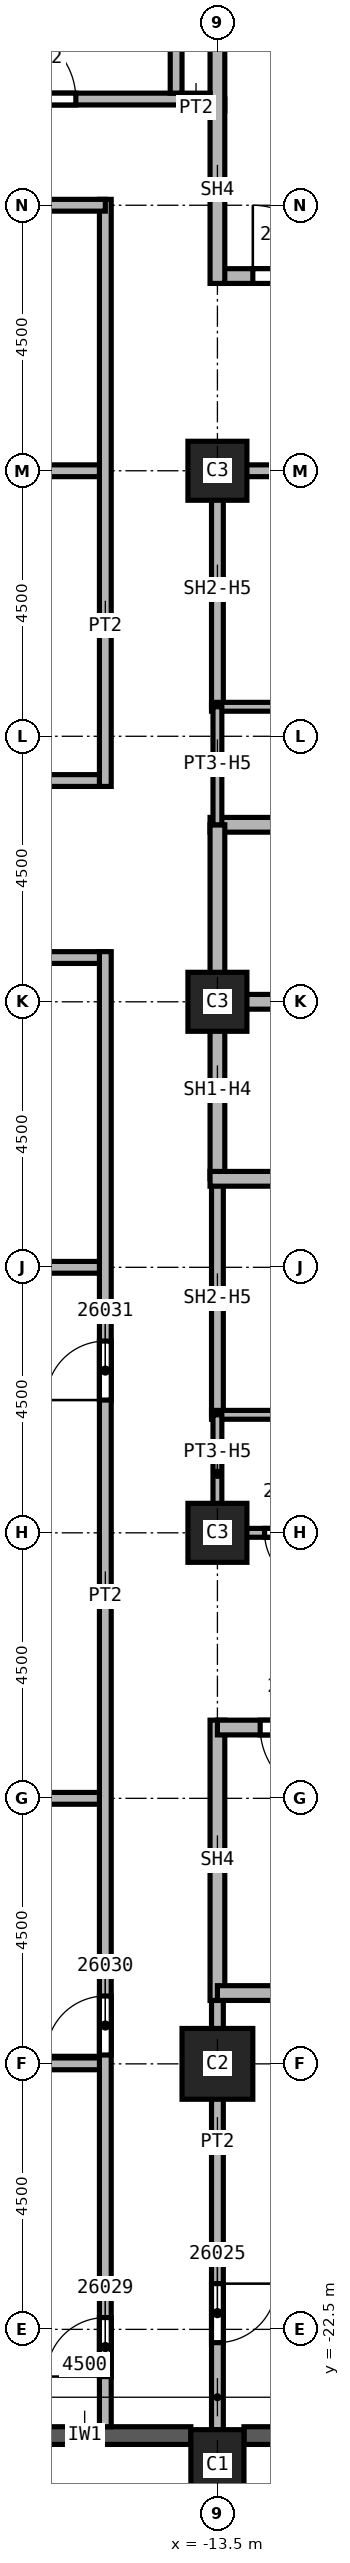
"""IFC4 building model, lengths in metres.
Left out: names, types, materials, properties, quantities, classifications, styles, units other than length and angle.
Written with IfcOpenShell. Run it as: python <this file> out.ifc"""

import sys

from ifc_helpers import new_model, si_unit, direction, frame, frame_2d, origin, origin_2d, place, context, subcontext, project, spatial, rectangle, extrude, element, fill, save


model = new_model("IFC4")
c1 = context("Model", 3, precision=1e-05, world=origin(), true_north=direction((0.0, 1.0)))
c2 = subcontext(c1, "Body", "Model", "MODEL_VIEW")
j1 = project(units=[si_unit("LENGTHUNIT", "METRE"), si_unit("PLANEANGLEUNIT", "RADIAN")], contexts=[c1])
p1 = place(None, origin())
s1 = spatial("IfcSite", under=j1, at=p1, CompositionType="ELEMENT")
p2 = place(p1, origin())
s2 = spatial("IfcBuilding", under=s1, at=p2, CompositionType="ELEMENT")
p3 = place(p2, frame((0.0, 0.0, 120.0)))
s3 = spatial("IfcBuildingStorey", under=s2, at=p3, CompositionType="ELEMENT", Elevation=120.0)
p4 = place(p3, frame((-13.5, -18.0, 0.0), z_axis=(0.0, 0.0, 1.0), x_axis=(1.0, 0.0, 0.0)))
e1 = element("IfcColumn", 1, at=p4, inside=s3, PredefinedType="COLUMN", context=c2, shape_type="SweptSolid", body=[
    extrude(rectangle(XDim=1.2, YDim=1.2, at=origin_2d()), origin(), (0.0, 0.0, 1.0), 5.7),
])
for number, where, z_axis, x_axis in (
    (2, (-13.5, 0.0, 0.0), (0.0, 0.0, 1.0), (1.0, 0.0, 0.0)),
    (3, (-13.5, 9.0, 0.0), (0.0, 0.0, 1.0), (1.0, 0.0, 0.0)),
    (4, (-13.5, -9.0, 0.0), (0.0, 0.0, 1.0), (1.0, 0.0, 0.0)),
):
    element("IfcColumn", number, at=place(p3, frame(where, z_axis=z_axis, x_axis=x_axis)), inside=s3, PredefinedType="COLUMN", context=c2, shape_type="SweptSolid", body=[
        extrude(rectangle(XDim=1.0, YDim=1.0, at=origin_2d()), origin(), (0.0, 0.0, 1.0), 5.7),
    ])
p5 = place(p3, frame((-13.5, -24.8, 0.0), z_axis=(0.0, 0.206004144013, 0.978551119078), x_axis=(-1.0, 0.0, 0.0)))
e5 = element("IfcColumn", 5, at=p5, inside=s3, PredefinedType="COLUMN", context=c2, shape_type="SweptSolid", body=[
    extrude(rectangle(XDim=0.9, YDim=1.2, at=origin_2d()), origin(), (0.0, 0.0, 1.0), 5.825),
])
for number, where, z_axis, x_axis in (
    (6, (-17.55, -24.3, 0.0), (0.0, 0.0, 1.0), (1.0, 0.0, 0.0)),
    (7, (-13.05, -24.3, 0.0), (0.0, 0.0, 1.0), (1.0, 0.0, 0.0)),
):
    element("IfcWall", number, at=place(p3, frame(where, z_axis=z_axis, x_axis=x_axis)), inside=s3, PredefinedType="SOLIDWALL", context=c2, shape_type="SweptSolid", body=[
        extrude(rectangle(XDim=3.6, YDim=0.3, at=frame_2d((1.8, 0.0))), origin(), (0.0, 0.0, 1.0), 5.1),
    ])
p6 = place(p3, frame((-33.85, 3.75, 0.0), z_axis=(0.0, 0.0, 1.0), x_axis=(1.0, 0.0, 0.0)))
e8 = element("IfcWall", 8, at=p6, inside=s3, PredefinedType="PARTITIONING", context=c2, shape_type="SweptSolid", body=[
    extrude(rectangle(XDim=18.45, YDim=0.2, at=frame_2d((9.225, 0.0))), origin(), (0.0, 0.0, 1.0), 5.7),
])
p7 = place(p6, frame((12.1, 0.0, 0.0)))
e9 = element("IfcOpeningElement", 9, at=p7, cuts=e8, PredefinedType="OPENING", context=c2, shape_type="SweptSolid", body=[
    extrude(rectangle(XDim=1.0, YDim=2.1, at=frame_2d((0.5, 1.05))), frame((0.0, 0.1, 0.0), z_axis=(0.0, -1.0, 0.0), x_axis=(1.0, 0.0, 0.0)), (0.0, 0.0, 1.0), 0.2),
])
p8 = place(p3, frame((-15.4, 0.75, 0.0), z_axis=(0.0, 0.0, 1.0), x_axis=(-1.0, 0.0, 0.0)))
e10 = element("IfcWall", 10, at=p8, inside=s3, PredefinedType="PARTITIONING", context=c2, shape_type="SweptSolid", body=[
    extrude(rectangle(XDim=18.45, YDim=0.2, at=frame_2d((9.225, 0.0))), origin(), (0.0, 0.0, 1.0), 5.7),
])
p9 = place(p8, frame((7.9, 0.0, 0.0)))
e11 = element("IfcOpeningElement", 11, at=p9, cuts=e10, PredefinedType="OPENING", context=c2, shape_type="SweptSolid", body=[
    extrude(rectangle(XDim=1.0, YDim=2.1, at=frame_2d((0.5, 1.05))), frame((0.0, 0.1, 0.0), z_axis=(0.0, -1.0, 0.0), x_axis=(1.0, 0.0, 0.0)), (0.0, 0.0, 1.0), 0.2),
])
p10 = place(p8, frame((13.4, 0.0, 0.0)))
e12 = element("IfcOpeningElement", 12, at=p10, cuts=e10, PredefinedType="OPENING", context=c2, shape_type="SweptSolid", body=[
    extrude(rectangle(XDim=1.0, YDim=2.1, at=frame_2d((0.5, 1.05))), frame((0.0, 0.1, 0.0), z_axis=(0.0, -1.0, 0.0), x_axis=(1.0, 0.0, 0.0)), (0.0, 0.0, 1.0), 0.2),
])
for number, where, z_axis, x_axis in (
    (13, (-27.1, -13.5, 0.0), (0.0, 0.0, 1.0), (1.0, 0.0, 0.0)),
    (14, (-27.1, -4.5, 0.0), (0.0, 0.0, 1.0), (1.0, 0.0, 0.0)),
    (15, (-27.1, 9.0, 0.0), (0.0, 0.0, 1.0), (1.0, 0.0, 0.0)),
):
    element("IfcWall", number, at=place(p3, frame(where, z_axis=z_axis, x_axis=x_axis)), inside=s3, PredefinedType="PARTITIONING", context=c2, shape_type="SweptSolid", body=[
        extrude(rectangle(XDim=11.7, YDim=0.2, at=frame_2d((5.85, 0.0))), origin(), (0.0, 0.0, 1.0), 5.7),
    ])
p11 = place(p3, frame((-24.15, -18.0, 0.0), z_axis=(0.0, 0.0, 1.0), x_axis=(1.0, 0.0, 0.0)))
e16 = element("IfcWall", 16, at=p11, inside=s3, PredefinedType="PARTITIONING", context=c2, shape_type="SweptSolid", body=[
    extrude(rectangle(XDim=8.75, YDim=0.2, at=frame_2d((4.375, 0.0))), origin(), (0.0, 0.0, 1.0), 5.7),
])
p12 = place(p3, frame((-15.4, -24.15, 0.0), z_axis=(0.0, 0.0, 1.0), x_axis=(0.0, 1.0, 0.0)))
e17 = element("IfcWall", 17, at=p12, inside=s3, PredefinedType="PARTITIONING", context=c2, shape_type="SweptSolid", body=[
    extrude(rectangle(XDim=25.0, YDim=0.2, at=frame_2d((12.5, 0.0))), origin(), (0.0, 0.0, 1.0), 5.7),
])
p13 = place(p12, frame((0.85, 0.0, 0.0)))
e18 = element("IfcOpeningElement", 18, at=p13, cuts=e17, PredefinedType="OPENING", context=c2, shape_type="SweptSolid", body=[
    extrude(rectangle(XDim=1.0, YDim=2.1, at=frame_2d((0.5, 1.05))), frame((0.0, 0.1, 0.0), z_axis=(0.0, -1.0, 0.0), x_axis=(1.0, 0.0, 0.0)), (0.0, 0.0, 1.0), 0.2),
])
p14 = place(p12, frame((6.3, 0.0, 0.0)))
e19 = element("IfcOpeningElement", 19, at=p14, cuts=e17, PredefinedType="OPENING", context=c2, shape_type="SweptSolid", body=[
    extrude(rectangle(XDim=1.0, YDim=2.1, at=frame_2d((0.5, 1.05))), frame((0.0, 0.1, 0.0), z_axis=(0.0, -1.0, 0.0), x_axis=(1.0, 0.0, 0.0)), (0.0, 0.0, 1.0), 0.2),
])
p15 = place(p12, frame((17.4, 0.0, 0.0)))
e20 = element("IfcOpeningElement", 20, at=p15, cuts=e17, PredefinedType="OPENING", context=c2, shape_type="SweptSolid", body=[
    extrude(rectangle(XDim=1.0, YDim=2.1, at=frame_2d((0.5, 1.05))), frame((0.0, 0.1, 0.0), z_axis=(0.0, -1.0, 0.0), x_axis=(1.0, 0.0, 0.0)), (0.0, 0.0, 1.0), 0.2),
])
p16 = place(p3, frame((-15.4, 3.65, 0.0), z_axis=(0.0, 0.0, 1.0), x_axis=(0.0, 1.0, 0.0)))
e21 = element("IfcWall", 21, at=p16, inside=s3, PredefinedType="PARTITIONING", context=c2, shape_type="SweptSolid", body=[
    extrude(rectangle(XDim=9.95, YDim=0.2, at=frame_2d((4.975, 0.0))), origin(), (0.0, 0.0, 1.0), 5.7),
])
p17 = place(p3, frame((-15.4, 13.5, 0.0), z_axis=(0.0, 0.0, 1.0), x_axis=(-1.0, 0.0, 0.0)))
e22 = element("IfcWall", 22, at=p17, inside=s3, PredefinedType="PARTITIONING", context=c2, shape_type="SweptSolid", body=[
    extrude(rectangle(XDim=6.6, YDim=0.2, at=frame_2d((3.3, 0.0))), origin(), (0.0, 0.0, 1.0), 5.7),
])
p18 = place(p17, frame((1.9, 0.0, 0.0)))
e23 = element("IfcOpeningElement", 23, at=p18, cuts=e22, PredefinedType="OPENING", context=c2, shape_type="SweptSolid", body=[
    extrude(rectangle(XDim=1.0, YDim=2.1, at=frame_2d((0.5, 1.05))), frame((0.0, 0.1, 0.0), z_axis=(0.0, -1.0, 0.0), x_axis=(1.0, 0.0, 0.0)), (0.0, 0.0, 1.0), 0.2),
])
p19 = place(p3, frame((-14.1, 15.2, 0.0), z_axis=(0.0, 0.0, 1.0), x_axis=(1.0, 0.0, 0.0)))
e24 = element("IfcWall", 24, at=p19, inside=s3, PredefinedType="PARTITIONING", context=c2, shape_type="SweptSolid", body=[
    extrude(rectangle(XDim=0.725, YDim=0.2, at=frame_2d((0.363, 0.0))), origin(), (0.0, 0.0, 1.0), 5.7),
])
p20 = place(p3, frame((-13.5, -16.675, 0.0), z_axis=(0.0, 0.0, 1.0), x_axis=(0.0, -1.0, 0.0)))
e25 = element("IfcWall", 25, at=p20, inside=s3, PredefinedType="PARTITIONING", context=c2, shape_type="SweptSolid", body=[
    extrude(rectangle(XDim=7.525, YDim=0.2, at=frame_2d((3.762, 0.0))), origin(), (0.0, 0.0, 1.0), 5.7),
])
p21 = place(p20, frame((5.05, 0.0, 0.0)))
e26 = element("IfcOpeningElement", 26, at=p21, cuts=e25, PredefinedType="OPENING", context=c2, shape_type="SweptSolid", body=[
    extrude(rectangle(XDim=1.0, YDim=2.1, at=frame_2d((0.5, 1.05))), frame((0.0, 0.1, 0.0), z_axis=(0.0, -1.0, 0.0), x_axis=(1.0, 0.0, 0.0)), (0.0, 0.0, 1.0), 0.2),
])
p22 = place(p3, frame((-13.5, -7.0, 0.0), z_axis=(0.0, 0.0, 1.0), x_axis=(0.0, 1.0, 0.0)))
e27 = element("IfcWall", 27, at=p22, inside=s3, PredefinedType="SOLIDWALL", context=c2, shape_type="SweptSolid", body=[
    extrude(rectangle(XDim=4.0, YDim=0.2, at=frame_2d((2.0, 0.0))), origin(), (0.0, 0.0, 1.0), 4.938),
])
p23 = place(p3, frame((-13.5, 5.0, 0.0), z_axis=(0.0, 0.0, 1.0), x_axis=(0.0, 1.0, 0.0)))
e28 = element("IfcWall", 28, at=p23, inside=s3, PredefinedType="SOLIDWALL", context=c2, shape_type="SweptSolid", body=[
    extrude(rectangle(XDim=4.1, YDim=0.2, at=frame_2d((2.05, 0.0))), origin(), (0.0, 0.0, 1.0), 4.938),
])
p24 = place(p3, frame((-13.5, 9.0, 0.0), z_axis=(0.0, 0.0, 1.0), x_axis=(1.0, 0.0, 0.0)))
e29 = element("IfcWall", 29, at=p24, inside=s3, PredefinedType="SOLIDWALL", context=c2, shape_type="SweptSolid", body=[
    extrude(rectangle(XDim=3.0, YDim=0.2, at=frame_2d((1.5, 0.0))), origin(), (0.0, 0.0, 1.0), 4.938),
])
p25 = place(p3, frame((-13.625, 0.0, 0.0), z_axis=(0.0, 0.0, 1.0), x_axis=(1.0, 0.0, 0.0)))
e30 = element("IfcWall", 30, at=p25, inside=s3, PredefinedType="SOLIDWALL", context=c2, shape_type="SweptSolid", body=[
    extrude(rectangle(XDim=3.125, YDim=0.25, at=frame_2d((1.562, 0.0))), origin(), (0.0, 0.0, 1.0), 5.7),
])
p26 = place(p3, frame((-13.625, 3.0, 0.0), z_axis=(0.0, 0.0, 1.0), x_axis=(1.0, 0.0, 0.0)))
e31 = element("IfcWall", 31, at=p26, inside=s3, PredefinedType="SOLIDWALL", context=c2, shape_type="SweptSolid", body=[
    extrude(rectangle(XDim=6.125, YDim=0.25, at=frame_2d((3.062, 0.0))), origin(), (0.0, 0.0, 1.0), 5.7),
])
p27 = place(p26, frame((3.25, 0.0, 0.0)))
e32 = element("IfcOpeningElement", 32, at=p27, cuts=e31, PredefinedType="OPENING", context=c2, shape_type="SweptSolid", body=[
    extrude(rectangle(XDim=1.1, YDim=2.1, at=frame_2d((0.55, 1.05))), frame((0.0, 0.125, 0.0), z_axis=(0.0, -1.0, 0.0), x_axis=(1.0, 0.0, 0.0)), (0.0, 0.0, 1.0), 0.25),
])
p28 = place(p3, frame((-13.5, -3.0, 0.0), z_axis=(0.0, 0.0, 1.0), x_axis=(0.0, 1.0, 0.0)))
e33 = element("IfcWall", 33, at=p28, inside=s3, PredefinedType="SOLIDWALL", context=c2, shape_type="SweptSolid", body=[
    extrude(rectangle(XDim=6.0, YDim=0.25, at=frame_2d((3.0, 0.0))), origin(), (0.0, 0.0, 1.0), 4.938),
])
p29 = place(p3, frame((-13.625, -3.0, 0.0), z_axis=(0.0, 0.0, 1.0), x_axis=(1.0, 0.0, 0.0)))
e34 = element("IfcWall", 34, at=p29, inside=s3, PredefinedType="SOLIDWALL", context=c2, shape_type="SweptSolid", body=[
    extrude(rectangle(XDim=9.25, YDim=0.25, at=frame_2d((4.625, 0.0))), origin(), (0.0, 0.0, 1.0), 5.7),
])
p30 = place(p29, frame((3.25, 0.0, 0.0)))
e35 = element("IfcOpeningElement", 35, at=p30, cuts=e34, PredefinedType="OPENING", context=c2, shape_type="SweptSolid", body=[
    extrude(rectangle(XDim=1.1, YDim=2.1, at=frame_2d((0.55, 1.05))), frame((0.0, 0.125, 0.0), z_axis=(0.0, -1.0, 0.0), x_axis=(1.0, 0.0, 0.0)), (0.0, 0.0, 1.0), 0.25),
])
p31 = place(p3, frame((-13.5, -12.175, 0.0), z_axis=(0.0, 0.0, 1.0), x_axis=(0.0, -1.0, 0.0)))
e36 = element("IfcWall", 36, at=p31, inside=s3, PredefinedType="SOLIDWALL", context=c2, shape_type="SweptSolid", body=[
    extrude(rectangle(XDim=4.75, YDim=0.25, at=frame_2d((2.375, 0.0))), origin(), (0.0, 0.0, 1.0), 5.7),
])
p32 = place(p3, frame((-13.5, 12.3, 0.0), z_axis=(0.0, 0.0, 1.0), x_axis=(1.0, 0.0, 0.0)))
e37 = element("IfcWall", 37, at=p32, inside=s3, PredefinedType="SOLIDWALL", context=c2, shape_type="SweptSolid", body=[
    extrude(rectangle(XDim=9.125, YDim=0.25, at=frame_2d((4.562, 0.0))), origin(), (0.0, 0.0, 1.0), 5.7),
])
p33 = place(p32, frame((0.6, 0.0, 0.0)))
e38 = element("IfcOpeningElement", 38, at=p33, cuts=e37, PredefinedType="OPENING", context=c2, shape_type="SweptSolid", body=[
    extrude(rectangle(XDim=1.2, YDim=2.1, at=frame_2d((0.6, 1.05))), frame((0.0, 0.125, 0.0), z_axis=(0.0, -1.0, 0.0), x_axis=(1.0, 0.0, 0.0)), (0.0, 0.0, 1.0), 0.25),
])
p34 = place(p3, frame((-13.5, 12.175, 0.0), z_axis=(0.0, 0.0, 1.0), x_axis=(0.0, 1.0, 0.0)))
e39 = element("IfcWall", 39, at=p34, inside=s3, PredefinedType="SOLIDWALL", context=c2, shape_type="SweptSolid", body=[
    extrude(rectangle(XDim=4.75, YDim=0.25, at=frame_2d((2.375, 0.0))), origin(), (0.0, 0.0, 1.0), 5.7),
])
p35 = place(p3, frame((-4.5, -16.8, 0.0), z_axis=(0.0, 0.0, 1.0), x_axis=(-1.0, 0.0, 0.0)))
e40 = element("IfcWall", 40, at=p35, inside=s3, PredefinedType="SOLIDWALL", context=c2, shape_type="SweptSolid", body=[
    extrude(rectangle(XDim=9.0, YDim=0.25, at=frame_2d((4.5, 0.0))), origin(), (0.0, 0.0, 1.0), 5.7),
])
p36 = place(p3, frame((-4.375, -12.3, 0.0), z_axis=(0.0, 0.0, 1.0), x_axis=(-1.0, 0.0, 0.0)))
e41 = element("IfcWall", 41, at=p36, inside=s3, PredefinedType="SOLIDWALL", context=c2, shape_type="SweptSolid", body=[
    extrude(rectangle(XDim=9.125, YDim=0.25, at=frame_2d((4.562, 0.0))), origin(), (0.0, 0.0, 1.0), 5.7),
])
p37 = place(p36, frame((7.2, 0.0, 0.0)))
e42 = element("IfcOpeningElement", 42, at=p37, cuts=e41, PredefinedType="OPENING", context=c2, shape_type="SweptSolid", body=[
    extrude(rectangle(XDim=1.2, YDim=2.1, at=frame_2d((0.6, 1.05))), frame((0.0, 0.125, 0.0), z_axis=(0.0, -1.0, 0.0), x_axis=(1.0, 0.0, 0.0)), (0.0, 0.0, 1.0), 0.25),
])
for number, where, z_axis, x_axis in (
    (43, (-13.6, -7.0, 0.0), (0.0, 0.0, 1.0), (1.0, 0.0, 0.0)),
    (44, (-13.6, 5.0, 0.0), (0.0, 0.0, 1.0), (1.0, 0.0, 0.0)),
):
    element("IfcWall", number, at=place(p3, frame(where, z_axis=z_axis, x_axis=x_axis)), inside=s3, PredefinedType="PARTITIONING", context=c2, shape_type="SweptSolid", body=[
        extrude(rectangle(XDim=3.1, YDim=0.15, at=frame_2d((1.55, 0.0))), origin(), (0.0, 0.0, 1.0), 5.7),
    ])
p38 = place(p3, frame((-13.5, -9.075, 0.0), z_axis=(0.0, 0.0, 1.0), x_axis=(0.0, 1.0, 0.0)))
e45 = element("IfcWall", 45, at=p38, inside=s3, PredefinedType="PARTITIONING", context=c2, shape_type="SweptSolid", body=[
    extrude(rectangle(XDim=2.075, YDim=0.15, at=frame_2d((1.038, 0.0))), origin(), (0.0, 0.0, 1.0), 4.938),
])
p39 = place(p3, frame((-13.5, 3.0, 0.0), z_axis=(0.0, 0.0, 1.0), x_axis=(0.0, 1.0, 0.0)))
e46 = element("IfcWall", 46, at=p39, inside=s3, PredefinedType="PARTITIONING", context=c2, shape_type="SweptSolid", body=[
    extrude(rectangle(XDim=2.0, YDim=0.15, at=frame_2d((1.0, 0.0))), origin(), (0.0, 0.0, 1.0), 4.938),
])
p40 = place(p3, frame((-10.5, -9.0, 0.0), z_axis=(0.0, 0.0, 1.0), x_axis=(-1.0, 0.0, 0.0)))
e47 = element("IfcWall", 47, at=p40, inside=s3, PredefinedType="PARTITIONING", context=c2, shape_type="SweptSolid", body=[
    extrude(rectangle(XDim=3.0, YDim=0.15, at=frame_2d((1.5, 0.0))), origin(), (0.0, 0.0, 1.0), 4.938),
])
p41 = place(p40, frame((1.3, 0.0, 0.0)))
e48 = element("IfcOpeningElement", 48, at=p41, cuts=e47, PredefinedType="OPENING", context=c2, shape_type="SweptSolid", body=[
    extrude(rectangle(XDim=0.9, YDim=2.1, at=frame_2d((0.45, 1.05))), frame((0.0, 0.075, 0.0), z_axis=(0.0, -1.0, 0.0), x_axis=(1.0, 0.0, 0.0)), (0.0, 0.0, 1.0), 0.15),
])
p42 = place(p3, frame((-21.9, 15.3, 0.0), z_axis=(0.0, 0.0, 1.0), x_axis=(1.0, 0.0, 0.0)))
e49 = element("IfcWall", 49, at=p42, inside=s3, PredefinedType="SOLIDWALL", context=c2, shape_type="SweptSolid", body=[
    extrude(rectangle(XDim=8.275, YDim=0.2, at=frame_2d((4.137, 0.0))), origin(), (0.0, 0.0, 1.0), 5.7),
])
p43 = place(p42, frame((4.8, 0.0, 0.0)))
e50 = element("IfcOpeningElement", 50, at=p43, cuts=e49, PredefinedType="OPENING", context=c2, shape_type="SweptSolid", body=[
    extrude(rectangle(XDim=1.2, YDim=2.1, at=frame_2d((0.6, 1.05))), frame((0.0, 0.1, 0.0), z_axis=(0.0, -1.0, 0.0), x_axis=(1.0, 0.0, 0.0)), (0.0, 0.0, 1.0), 0.2),
])
p44 = place(p3, frame((-14.2, 15.4, 0.0), z_axis=(0.0, 0.0, 1.0), x_axis=(0.0, 1.0, 0.0)))
e51 = element("IfcWall", 51, at=p44, inside=s3, PredefinedType="SOLIDWALL", context=c2, shape_type="SweptSolid", body=[
    extrude(rectangle(XDim=5.9, YDim=0.2, at=frame_2d((2.95, 0.0))), origin(), (0.0, 0.0, 1.0), 5.7),
])
p45 = place(p41, origin())
e52 = element("IfcDoor", 52, at=p45, inside=s3, OperationType="SINGLE_SWING_LEFT", PredefinedType="DOOR", context=c2, shape_type="SweptSolid", body=[
    extrude(rectangle(XDim=0.9, YDim=2.1, at=frame_2d((0.45, 1.05))), frame((0.0, 0.025, 0.0), z_axis=(0.0, -1.0, 0.0), x_axis=(1.0, 0.0, 0.0)), (0.0, 0.0, 1.0), 0.05),
])
fill(e48, e52)
p46 = place(p33, origin())
e53 = element("IfcDoor", 53, at=p46, inside=s3, OperationType="SINGLE_SWING_LEFT", PredefinedType="DOOR", context=c2, shape_type="SweptSolid", body=[
    extrude(rectangle(XDim=1.2, YDim=2.1, at=frame_2d((0.6, 1.05))), frame((0.0, 0.025, 0.0), z_axis=(0.0, -1.0, 0.0), x_axis=(1.0, 0.0, 0.0)), (0.0, 0.0, 1.0), 0.05),
])
fill(e38, e53)
p47 = place(p37, origin())
e54 = element("IfcDoor", 54, at=p47, inside=s3, OperationType="SINGLE_SWING_RIGHT", PredefinedType="DOOR", context=c2, shape_type="SweptSolid", body=[
    extrude(rectangle(XDim=1.2, YDim=2.1, at=frame_2d((0.6, 1.05))), frame((0.0, 0.025, 0.0), z_axis=(0.0, -1.0, 0.0), x_axis=(1.0, 0.0, 0.0)), (0.0, 0.0, 1.0), 0.05),
])
fill(e42, e54)
p48 = place(p21, origin())
e55 = element("IfcDoor", 55, at=p48, inside=s3, OperationType="SINGLE_SWING_RIGHT", PredefinedType="DOOR", context=c2, shape_type="SweptSolid", body=[
    extrude(rectangle(XDim=1.0, YDim=2.1, at=frame_2d((0.5, 1.05))), frame((0.0, 0.025, 0.0), z_axis=(0.0, -1.0, 0.0), x_axis=(1.0, 0.0, 0.0)), (0.0, 0.0, 1.0), 0.05),
])
fill(e26, e55)
p49 = place(p13, origin())
e56 = element("IfcDoor", 56, at=p49, inside=s3, OperationType="SINGLE_SWING_RIGHT", PredefinedType="DOOR", context=c2, shape_type="SweptSolid", body=[
    extrude(rectangle(XDim=1.0, YDim=2.1, at=frame_2d((0.5, 1.05))), frame((0.0, 0.025, 0.0), z_axis=(0.0, -1.0, 0.0), x_axis=(1.0, 0.0, 0.0)), (0.0, 0.0, 1.0), 0.05),
])
fill(e18, e56)
p50 = place(p14, origin())
e57 = element("IfcDoor", 57, at=p50, inside=s3, OperationType="SINGLE_SWING_LEFT", PredefinedType="DOOR", context=c2, shape_type="SweptSolid", body=[
    extrude(rectangle(XDim=1.0, YDim=2.1, at=frame_2d((0.5, 1.05))), frame((0.0, 0.025, 0.0), z_axis=(0.0, -1.0, 0.0), x_axis=(1.0, 0.0, 0.0)), (0.0, 0.0, 1.0), 0.05),
])
fill(e19, e57)
p51 = place(p15, origin())
e58 = element("IfcDoor", 58, at=p51, inside=s3, OperationType="SINGLE_SWING_RIGHT", PredefinedType="DOOR", context=c2, shape_type="SweptSolid", body=[
    extrude(rectangle(XDim=1.0, YDim=2.1, at=frame_2d((0.5, 1.05))), frame((0.0, 0.025, 0.0), z_axis=(0.0, -1.0, 0.0), x_axis=(1.0, 0.0, 0.0)), (0.0, 0.0, 1.0), 0.05),
])
fill(e20, e58)
p52 = place(p43, origin())
e59 = element("IfcDoor", 59, at=p52, inside=s3, OperationType="SINGLE_SWING_RIGHT", PredefinedType="DOOR", context=c2, shape_type="SweptSolid", body=[
    extrude(rectangle(XDim=1.2, YDim=2.1, at=frame_2d((0.6, 1.05))), frame((0.0, 0.025, 0.0), z_axis=(0.0, -1.0, 0.0), x_axis=(1.0, 0.0, 0.0)), (0.0, 0.0, 1.0), 0.05),
])
fill(e50, e59)
save(model, sys.argv[1])
